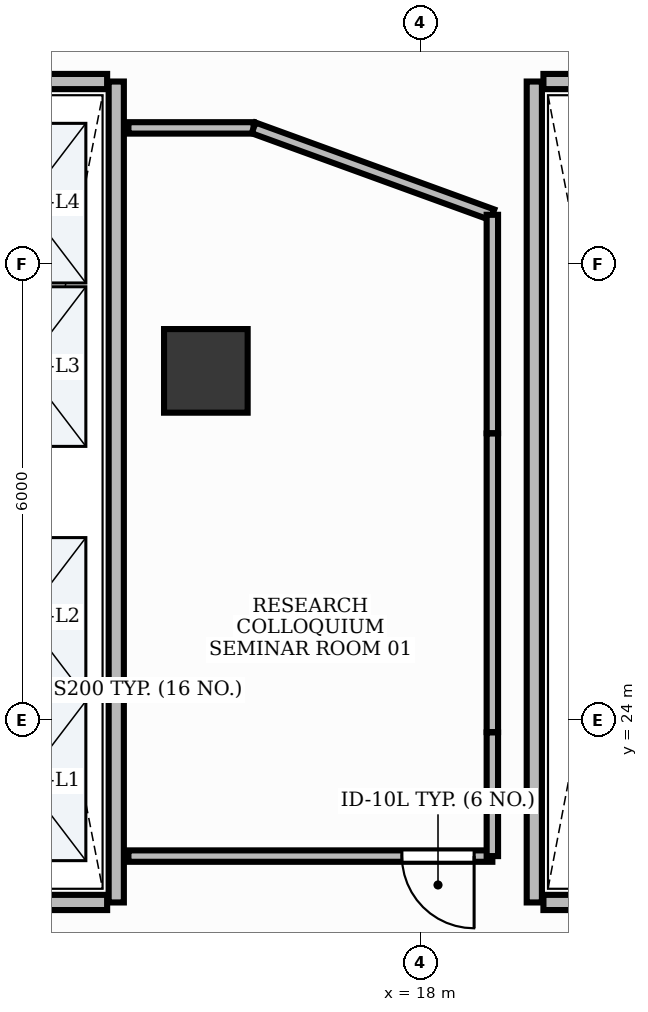
"""IFC4 building model, lengths in metres.
Left out: names, types, materials, properties, quantities, classifications, styles, units other than length and angle.
Written with IfcOpenShell. Run it as: python <this file> out.ifc"""

import sys

from ifc_helpers import new_model, si_unit, direction, frame, frame_2d, origin, origin_2d, place, context, subcontext, project, spatial, rectangle, extrude, element, fill, save


model = new_model("IFC4")
c1 = context("Model", 3, precision=1e-05, world=origin(), true_north=direction((0.0, 1.0)))
c2 = subcontext(c1, "Body", "Model", "MODEL_VIEW")
j1 = project(units=[si_unit("LENGTHUNIT", "METRE"), si_unit("PLANEANGLEUNIT", "RADIAN")], contexts=[c1])
p1 = place(None, origin())
s1 = spatial("IfcSite", under=j1, at=p1, CompositionType="ELEMENT")
p2 = place(p1, origin())
s2 = spatial("IfcBuilding", under=s1, at=p2, CompositionType="ELEMENT")
p3 = place(p2, frame((0.0, 0.0, 51.0)))
s3 = spatial("IfcBuildingStorey", under=s2, at=p3, CompositionType="ELEMENT", Elevation=51.0)
p4 = place(p3, frame((15.179, 28.594, -0.0), z_axis=(0.0, 0.0, 1.0), x_axis=(1.0, 0.0, 0.0)))
e1 = element("IfcColumn", 1, at=p4, inside=s3, PredefinedType="COLUMN", context=c2, shape_type="SweptSolid", body=[
    extrude(rectangle(XDim=1.1, YDim=1.1, at=origin_2d()), origin(), (0.0, 0.0, 1.0), 3.901),
])
p5 = place(p3, frame((14.0, 21.6, 0.0), z_axis=(0.0, 0.0, 1.0), x_axis=(0.0, 1.0, 0.0)))
e2 = element("IfcWall", 2, at=p5, inside=s3, PredefinedType="PARTITIONING", context=c2, shape_type="SweptSolid", body=[
    extrude(rectangle(XDim=10.8, YDim=0.2, at=frame_2d((5.4, 0.0))), origin(), (0.0, 0.0, 1.0), 2.91),
])
for number, where, z_axis, x_axis in (
    (3, (11.72, 21.6, 0.0), (0.0, 0.0, 1.0), (1.0, 0.0, 0.0)),
    (4, (11.72, 32.4, 0.0), (0.0, 0.0, 1.0), (1.0, 0.0, 0.0)),
):
    element("IfcWall", number, at=place(p3, frame(where, z_axis=z_axis, x_axis=x_axis)), inside=s3, PredefinedType="PARTITIONING", context=c2, shape_type="SweptSolid", body=[
        extrude(rectangle(XDim=2.16, YDim=0.2, at=frame_2d((1.08, 0.0))), origin(), (0.0, 0.0, 1.0), 2.91),
    ])
p6 = place(p3, frame((19.5, 21.6, 0.0), z_axis=(0.0, 0.0, 1.0), x_axis=(0.0, 1.0, 0.0)))
e5 = element("IfcWall", 5, at=p6, inside=s3, PredefinedType="PARTITIONING", context=c2, shape_type="SweptSolid", body=[
    extrude(rectangle(XDim=10.8, YDim=0.2, at=frame_2d((5.4, 0.0))), origin(), (0.0, 0.0, 1.0), 2.91),
])
for number, where, z_axis, x_axis in (
    (6, (19.62, 21.6, 0.0), (0.0, 0.0, 1.0), (1.0, 0.0, 0.0)),
    (7, (19.62, 32.4, 0.0), (0.0, 0.0, 1.0), (1.0, 0.0, 0.0)),
):
    element("IfcWall", number, at=place(p3, frame(where, z_axis=z_axis, x_axis=x_axis)), inside=s3, PredefinedType="PARTITIONING", context=c2, shape_type="SweptSolid", body=[
        extrude(rectangle(XDim=2.11, YDim=0.2, at=frame_2d((1.055, 0.0))), origin(), (0.0, 0.0, 1.0), 2.91),
    ])
p7 = place(p3, frame((18.948, 22.21, 0.0), z_axis=(0.0, 0.0, 1.0), x_axis=(-1.0, 0.0, 0.0)))
e8 = element("IfcWall", 8, at=p7, inside=s3, PredefinedType="PARTITIONING", context=c2, shape_type="SweptSolid", body=[
    extrude(rectangle(XDim=4.788, YDim=0.15, at=frame_2d((2.394, 0.0))), origin(), (0.0, 0.0, 1.0), 2.91),
])
p8 = place(p7, frame((0.24, 0.0, 0.0)))
e9 = element("IfcOpeningElement", 9, at=p8, cuts=e8, PredefinedType="OPENING", context=c2, shape_type="SweptSolid", body=[
    extrude(rectangle(XDim=0.95, YDim=2.15, at=frame_2d((0.475, 1.075))), frame((0.0, 0.09, 0.0), z_axis=(0.0, -1.0, 0.0), x_axis=(1.0, 0.0, 0.0)), (0.0, 0.0, 1.0), 0.18),
])
p9 = place(p3, frame((14.16, 31.79, 0.0), z_axis=(0.0, 0.0, 1.0), x_axis=(1.0, 0.0, 0.0)))
e10 = element("IfcWall", 10, at=p9, inside=s3, PredefinedType="PARTITIONING", context=c2, shape_type="SweptSolid", body=[
    extrude(rectangle(XDim=1.647, YDim=0.15, at=frame_2d((0.824, 0.0))), origin(), (0.0, 0.0, 1.0), 2.91),
])
p10 = place(p3, frame((15.807, 31.79, 0.0), z_axis=(0.0, 0.0, 1.0), x_axis=(0.939695275892, -0.342012848393, 0.0)))
e11 = element("IfcWall", 11, at=p10, inside=s3, PredefinedType="PARTITIONING", context=c2, shape_type="SweptSolid", body=[
    extrude(rectangle(XDim=3.342, YDim=0.15, at=frame_2d((1.671, 0.0))), origin(), (0.0, 0.0, 1.0), 2.91),
])
p11 = place(p3, frame((18.948, 30.647, 0.0), z_axis=(0.0, 0.0, 1.0), x_axis=(0.0, -1.0, 0.0)))
e12 = element("IfcWall", 12, at=p11, inside=s3, PredefinedType="PARTITIONING", context=c2, shape_type="SweptSolid", body=[
    extrude(rectangle(XDim=2.873, YDim=0.15, at=frame_2d((1.437, 0.0))), origin(), (0.0, 0.0, 1.0), 2.91),
])
p12 = place(p3, frame((18.948, 27.769, 0.0), z_axis=(0.0, 0.0, 1.0), x_axis=(0.0, -1.0, 0.0)))
e13 = element("IfcWall", 13, at=p12, inside=s3, PredefinedType="PARTITIONING", context=c2, shape_type="SweptSolid", body=[
    extrude(rectangle(XDim=3.928, YDim=0.15, at=frame_2d((1.964, 0.0))), origin(), (0.0, 0.0, 1.0), 2.91),
])
p13 = place(p3, frame((18.948, 23.837, 0.0), z_axis=(0.0, 0.0, 1.0), x_axis=(0.0, -1.0, 0.0)))
e14 = element("IfcWall", 14, at=p13, inside=s3, PredefinedType="PARTITIONING", context=c2, shape_type="SweptSolid", body=[
    extrude(rectangle(XDim=1.627, YDim=0.15, at=frame_2d((0.813, 0.0))), origin(), (0.0, 0.0, 1.0), 2.91),
])
p14 = place(p8, origin())
e15 = element("IfcDoor", 15, at=p14, inside=s3, OperationType="SINGLE_SWING_LEFT", PredefinedType="DOOR", context=c2, shape_type="SweptSolid", body=[
    extrude(rectangle(XDim=0.95, YDim=2.15, at=frame_2d((0.475, 1.075))), frame((0.0, 0.025, 0.0), z_axis=(0.0, -1.0, 0.0), x_axis=(1.0, 0.0, 0.0)), (0.0, 0.0, 1.0), 0.05),
])
fill(e9, e15)
save(model, sys.argv[1])
